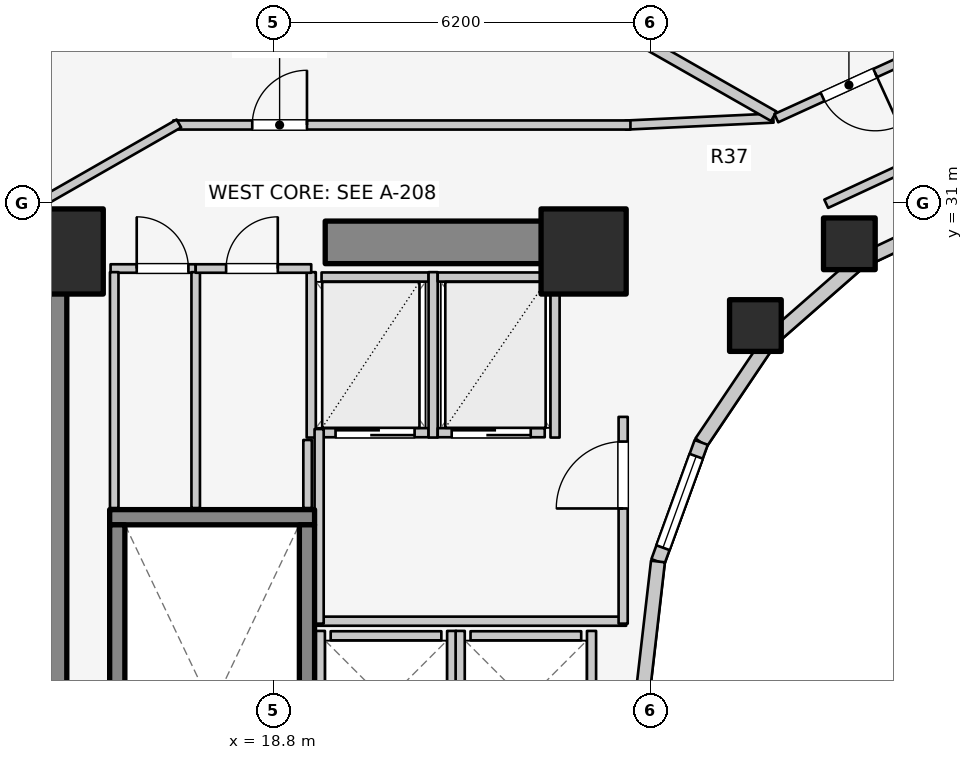
"""IFC4 building model, lengths in metres.
Left out: names, types, materials, properties, quantities, classifications, styles, units other than length and angle.
Written with IfcOpenShell. Run it as: python <this file> out.ifc"""

import sys

from ifc_helpers import new_model, si_unit, direction, frame, frame_2d, origin, origin_2d, place, context, subcontext, project, spatial, rectangle, extrude, element, fill, save


model = new_model("IFC4")
c1 = context("Model", 3, precision=1e-05, world=origin(), true_north=direction((0.0, 1.0)))
c2 = subcontext(c1, "Body", "Model", "MODEL_VIEW")
j1 = project(units=[si_unit("LENGTHUNIT", "METRE"), si_unit("PLANEANGLEUNIT", "RADIAN")], contexts=[c1])
p1 = place(None, origin())
s1 = spatial("IfcSite", under=j1, at=p1, CompositionType="ELEMENT")
p2 = place(p1, origin())
s2 = spatial("IfcBuilding", under=s1, at=p2, CompositionType="ELEMENT")
p3 = place(p2, frame((0.0, 0.0, 88.7)))
s3 = spatial("IfcBuildingStorey", under=s2, at=p3, CompositionType="ELEMENT", Elevation=88.7)
p4 = place(p3, frame((15.05, 17.05, 0.0), z_axis=(0.0, 0.0, 1.0), x_axis=(0.0, 1.0, 0.0)))
e1 = element("IfcWall", 1, at=p4, inside=s3, PredefinedType="SHEAR", context=c2, shape_type="SweptSolid", body=[
    extrude(rectangle(XDim=12.8, YDim=0.7, at=frame_2d((6.4, 0.0))), origin(), (0.0, 0.0, 1.0), 3.1),
])
p5 = place(p3, frame((19.65, 30.35, 0.0), z_axis=(0.0, 0.0, 1.0), x_axis=(1.0, 0.0, 0.0)))
e2 = element("IfcWall", 2, at=p5, inside=s3, PredefinedType="SHEAR", context=c2, shape_type="SweptSolid", body=[
    extrude(rectangle(XDim=4.5, YDim=0.7, at=frame_2d((2.25, 0.0))), origin(), (0.0, 0.0, 1.0), 3.1),
])
p6 = place(p3, frame((16.105, 25.83, 0.0), z_axis=(0.0, 0.0, 1.0), x_axis=(1.0, 0.0, 0.0)))
e3 = element("IfcWall", 3, at=p6, inside=s3, PredefinedType="SOLIDWALL", context=c2, shape_type="SweptSolid", body=[
    extrude(rectangle(XDim=3.37, YDim=0.25, at=frame_2d((1.685, 0.0))), origin(), (0.0, 0.0, 1.0), 3.1),
])
for number, where, z_axis, x_axis in (
    (4, (16.23, 17.895, 0.0), (0.0, 0.0, 1.0), (0.0, 1.0, 0.0)),
    (5, (19.35, 17.895, 0.0), (0.0, 0.0, 1.0), (0.0, 1.0, 0.0)),
):
    element("IfcWall", number, at=place(p3, frame(where, z_axis=z_axis, x_axis=x_axis)), inside=s3, PredefinedType="SOLIDWALL", context=c2, shape_type="SweptSolid", body=[
        extrude(rectangle(XDim=7.81, YDim=0.25, at=frame_2d((3.905, 0.0))), origin(), (0.0, 0.0, 1.0), 3.1),
    ])
for number, where, z_axis, x_axis in (
    (6, (23.9, 30.2, 0.0), (0.0, 0.0, 1.0), (1.0, 0.0, 0.0)),
    (7, (15.3, 30.2, 0.0), (0.0, 0.0, 1.0), (1.0, 0.0, 0.0)),
):
    element("IfcColumn", number, at=place(p3, frame(where, z_axis=z_axis, x_axis=x_axis)), inside=s3, PredefinedType="COLUMN", context=c2, shape_type="SweptSolid", body=[
        extrude(rectangle(XDim=1.4, YDim=1.4, at=origin_2d()), origin(), (0.0, 0.0, 1.0), 3.1),
    ])
for number, where, z_axis, x_axis in (
    (8, (28.27, 30.327, 0.0), (0.0, 0.0, 1.0), (1.0, 0.0, 0.0)),
    (9, (26.725, 28.982, 0.0), (0.0, 0.0, 1.0), (1.0, 0.0, 0.0)),
):
    element("IfcColumn", number, at=place(p3, frame(where, z_axis=z_axis, x_axis=x_axis)), inside=s3, PredefinedType="COLUMN", context=c2, shape_type="SweptSolid", body=[
        extrude(rectangle(XDim=0.85, YDim=0.85, at=origin_2d()), origin(), (0.0, 0.0, 1.0), 3.1),
    ])
p7 = place(p3, frame((30.157, 30.843, 0.0), z_axis=(0.0, 0.0, 1.0), x_axis=(-0.904179699603, -0.427152280606, 0.0)))
e10 = element("IfcWall", 10, at=p7, inside=s3, PredefinedType="STANDARD", context=c2, shape_type="SweptSolid", body=[
    extrude(rectangle(XDim=1.899, YDim=0.23, at=frame_2d((0.95, 0.0))), origin(), (0.0, 0.0, 1.0), 2.16),
])
p8 = place(p3, frame((28.44, 30.032, 0.0), z_axis=(0.0, 0.0, 1.0), x_axis=(-0.752576694707, -0.658504607869, 0.0)))
e11 = element("IfcWall", 11, at=p8, inside=s3, PredefinedType="STANDARD", context=c2, shape_type="SweptSolid", body=[
    extrude(rectangle(XDim=1.959, YDim=0.23, at=frame_2d((0.98, 0.0))), origin(), (0.0, 0.0, 1.0), 2.16),
])
p9 = place(p3, frame((26.965, 28.742, 0.0), z_axis=(0.0, 0.0, 1.0), x_axis=(-0.558197800898, -0.829707909492, 0.0)))
e12 = element("IfcWall", 12, at=p9, inside=s3, PredefinedType="STANDARD", context=c2, shape_type="SweptSolid", body=[
    extrude(rectangle(XDim=2.027, YDim=0.23, at=frame_2d((1.013, 0.0))), origin(), (0.0, 0.0, 1.0), 2.16),
])
p10 = place(p3, frame((25.834, 27.06, 0.0), z_axis=(0.0, 0.0, 1.0), x_axis=(-0.341423187295, -0.93990968033, 0.0)))
e13 = element("IfcWall", 13, at=p10, inside=s3, PredefinedType="STANDARD", context=c2, shape_type="SweptSolid", body=[
    extrude(rectangle(XDim=2.084, YDim=0.23, at=frame_2d((1.042, 0.0))), origin(), (0.0, 0.0, 1.0), 2.84),
])
p11 = place(p10, frame((0.242, 0.0, 0.85)))
e14 = element("IfcOpeningElement", 14, at=p11, cuts=e13, PredefinedType="OPENING", context=c2, shape_type="SweptSolid", body=[
    extrude(rectangle(XDim=1.6, YDim=1.65, at=frame_2d((0.8, 0.825))), frame((0.0, 0.125, 0.0), z_axis=(0.0, -1.0, 0.0), x_axis=(1.0, 0.0, 0.0)), (0.0, 0.0, 1.0), 0.25),
])
p12 = place(p3, frame((25.123, 25.102, 0.0), z_axis=(0.0, 0.0, 1.0), x_axis=(-0.114711713601, -0.993398823617, 0.0)))
e15 = element("IfcWall", 15, at=p12, inside=s3, PredefinedType="STANDARD", context=c2, shape_type="SweptSolid", body=[
    extrude(rectangle(XDim=2.115, YDim=0.23, at=frame_2d((1.058, 0.0))), origin(), (0.0, 0.0, 1.0), 2.84),
])
p13 = place(p3, frame((19.74, 23.88, 0.0), z_axis=(0.0, 0.0, 1.0), x_axis=(1.0, 0.0, 0.0)))
e16 = element("IfcWall", 16, at=p13, inside=s3, PredefinedType="SOLIDWALL", context=c2, shape_type="SweptSolid", body=[
    extrude(rectangle(XDim=1.82, YDim=0.15, at=frame_2d((0.91, 0.0))), origin(), (0.0, 0.0, 1.0), 2.855),
])
for number, where, z_axis, x_axis in (
    (17, (19.57, 21.64, 0.0), (0.0, 0.0, 1.0), (0.0, 1.0, 0.0)),
    (18, (21.73, 21.64, 0.0), (0.0, 0.0, 1.0), (0.0, 1.0, 0.0)),
):
    element("IfcWall", number, at=place(p3, frame(where, z_axis=z_axis, x_axis=x_axis)), inside=s3, PredefinedType="SOLIDWALL", context=c2, shape_type="SweptSolid", body=[
        extrude(rectangle(XDim=2.32, YDim=0.15, at=frame_2d((1.16, 0.0))), origin(), (0.0, 0.0, 1.0), 2.855),
    ])
p14 = place(p3, frame((22.04, 23.88, 0.0), z_axis=(0.0, 0.0, 1.0), x_axis=(1.0, 0.0, 0.0)))
e19 = element("IfcWall", 19, at=p14, inside=s3, PredefinedType="SOLIDWALL", context=c2, shape_type="SweptSolid", body=[
    extrude(rectangle(XDim=1.82, YDim=0.15, at=frame_2d((0.91, 0.0))), origin(), (0.0, 0.0, 1.0), 2.12),
])
p15 = place(p3, frame((21.87, 21.64, 0.0), z_axis=(0.0, 0.0, 1.0), x_axis=(0.0, 1.0, 0.0)))
e20 = element("IfcWall", 20, at=p15, inside=s3, PredefinedType="SOLIDWALL", context=c2, shape_type="SweptSolid", body=[
    extrude(rectangle(XDim=2.32, YDim=0.15, at=frame_2d((1.16, 0.0))), origin(), (0.0, 0.0, 1.0), 2.855),
])
p16 = place(p3, frame((24.03, 21.64, 0.0), z_axis=(0.0, 0.0, 1.0), x_axis=(0.0, 1.0, 0.0)))
e21 = element("IfcWall", 21, at=p16, inside=s3, PredefinedType="SOLIDWALL", context=c2, shape_type="SweptSolid", body=[
    extrude(rectangle(XDim=2.32, YDim=0.15, at=frame_2d((1.16, 0.0))), origin(), (0.0, 0.0, 1.0), 2.12),
])
p17 = place(p3, frame((19.59, 27.22, 0.0), z_axis=(0.0, 0.0, 1.0), x_axis=(1.0, 0.0, 0.0)))
e22 = element("IfcWall", 22, at=p17, inside=s3, PredefinedType="SOLIDWALL", context=c2, shape_type="SweptSolid", body=[
    extrude(rectangle(XDim=1.76, YDim=0.15, at=frame_2d((0.88, 0.0))), origin(), (0.0, 0.0, 1.0), 2.855),
])
p18 = place(p17, frame((0.23, 0.0, 0.0)))
e23 = element("IfcOpeningElement", 23, at=p18, cuts=e22, PredefinedType="OPENING", context=c2, shape_type="SweptSolid", body=[
    extrude(rectangle(XDim=1.3, YDim=2.1, at=frame_2d((0.65, 1.05))), frame((0.0, 0.085, 0.0), z_axis=(0.0, -1.0, 0.0), x_axis=(1.0, 0.0, 0.0)), (0.0, 0.0, 1.0), 0.17),
])
p19 = place(p3, frame((19.59, 29.78, 0.0), z_axis=(0.0, 0.0, 1.0), x_axis=(1.0, 0.0, 0.0)))
e24 = element("IfcWall", 24, at=p19, inside=s3, PredefinedType="SOLIDWALL", context=c2, shape_type="SweptSolid", body=[
    extrude(rectangle(XDim=1.76, YDim=0.15, at=frame_2d((0.88, 0.0))), origin(), (0.0, 0.0, 1.0), 2.855),
])
for number, where, z_axis, x_axis in (
    (25, (19.42, 27.14, 0.0), (0.0, 0.0, 1.0), (0.0, 1.0, 0.0)),
    (26, (21.425, 27.14, 0.0), (0.0, 0.0, 1.0), (0.0, 1.0, 0.0)),
):
    element("IfcWall", number, at=place(p3, frame(where, z_axis=z_axis, x_axis=x_axis)), inside=s3, PredefinedType="SOLIDWALL", context=c2, shape_type="SweptSolid", body=[
        extrude(rectangle(XDim=2.72, YDim=0.15, at=frame_2d((1.36, 0.0))), origin(), (0.0, 0.0, 1.0), 2.855),
    ])
p20 = place(p3, frame((21.5, 27.22, 0.0), z_axis=(0.0, 0.0, 1.0), x_axis=(1.0, 0.0, 0.0)))
e27 = element("IfcWall", 27, at=p20, inside=s3, PredefinedType="SOLIDWALL", context=c2, shape_type="SweptSolid", body=[
    extrude(rectangle(XDim=1.76, YDim=0.15, at=frame_2d((0.88, 0.0))), origin(), (0.0, 0.0, 1.0), 2.855),
])
p21 = place(p20, frame((0.23, 0.0, 0.0)))
e28 = element("IfcOpeningElement", 28, at=p21, cuts=e27, PredefinedType="OPENING", context=c2, shape_type="SweptSolid", body=[
    extrude(rectangle(XDim=1.3, YDim=2.1, at=frame_2d((0.65, 1.05))), frame((0.0, 0.085, 0.0), z_axis=(0.0, -1.0, 0.0), x_axis=(1.0, 0.0, 0.0)), (0.0, 0.0, 1.0), 0.17),
])
p22 = place(p3, frame((21.5, 29.78, 0.0), z_axis=(0.0, 0.0, 1.0), x_axis=(1.0, 0.0, 0.0)))
e29 = element("IfcWall", 29, at=p22, inside=s3, PredefinedType="SOLIDWALL", context=c2, shape_type="SweptSolid", body=[
    extrude(rectangle(XDim=1.76, YDim=0.15, at=frame_2d((0.88, 0.0))), origin(), (0.0, 0.0, 1.0), 2.855),
])
p23 = place(p3, frame((23.43, 27.14, 0.0), z_axis=(0.0, 0.0, 1.0), x_axis=(0.0, 1.0, 0.0)))
e30 = element("IfcWall", 30, at=p23, inside=s3, PredefinedType="SOLIDWALL", context=c2, shape_type="SweptSolid", body=[
    extrude(rectangle(XDim=2.72, YDim=0.15, at=frame_2d((1.36, 0.0))), origin(), (0.0, 0.0, 1.0), 2.855),
])
p24 = place(p3, frame((19.52, 24.12, 0.0), z_axis=(0.0, 0.0, 1.0), x_axis=(1.0, 0.0, 0.0)))
e31 = element("IfcWall", 31, at=p24, inside=s3, PredefinedType="PARTITIONING", context=c2, shape_type="SweptSolid", body=[
    extrude(rectangle(XDim=5.08, YDim=0.15, at=frame_2d((2.54, 0.0))), origin(), (0.0, 0.0, 1.0), 2.12),
])
p25 = place(p3, frame((19.55, 24.08, 0.0), z_axis=(0.0, 0.0, 1.0), x_axis=(0.0, 1.0, 0.0)))
e32 = element("IfcWall", 32, at=p25, inside=s3, PredefinedType="PARTITIONING", context=c2, shape_type="SweptSolid", body=[
    extrude(rectangle(XDim=3.2, YDim=0.15, at=frame_2d((1.6, 0.0))), origin(), (0.0, 0.0, 1.0), 2.855),
])
p26 = place(p3, frame((24.55, 24.08, 0.0), z_axis=(0.0, 0.0, 1.0), x_axis=(0.0, 1.0, 0.0)))
e33 = element("IfcWall", 33, at=p26, inside=s3, PredefinedType="PARTITIONING", context=c2, shape_type="SweptSolid", body=[
    extrude(rectangle(XDim=3.4, YDim=0.15, at=frame_2d((1.7, 0.0))), origin(), (0.0, 0.0, 1.0), 2.855),
])
p27 = place(p26, frame((1.894, 0.0, 0.0)))
e34 = element("IfcOpeningElement", 34, at=p27, cuts=e33, PredefinedType="OPENING", context=c2, shape_type="SweptSolid", body=[
    extrude(rectangle(XDim=1.1, YDim=2.1, at=frame_2d((0.55, 1.05))), frame((0.0, 0.085, 0.0), z_axis=(0.0, -1.0, 0.0), x_axis=(1.0, 0.0, 0.0)), (0.0, 0.0, 1.0), 0.17),
])
p28 = place(p3, frame((16.12, 29.92, 0.0), z_axis=(0.0, 0.0, 1.0), x_axis=(1.0, 0.0, 0.0)))
e35 = element("IfcWall", 35, at=p28, inside=s3, PredefinedType="PLUMBINGWALL", context=c2, shape_type="SweptSolid", body=[
    extrude(rectangle(XDim=1.4, YDim=0.14, at=frame_2d((0.7, 0.0))), origin(), (0.0, 0.0, 1.0), 2.855),
])
p29 = place(p28, frame((0.43, 0.0, 0.0)))
e36 = element("IfcOpeningElement", 36, at=p29, cuts=e35, PredefinedType="OPENING", context=c2, shape_type="SweptSolid", body=[
    extrude(rectangle(XDim=0.85, YDim=2.05, at=frame_2d((0.425, 1.025))), frame((0.0, 0.08, 0.0), z_axis=(0.0, -1.0, 0.0), x_axis=(1.0, 0.0, 0.0)), (0.0, 0.0, 1.0), 0.16),
])
for number, where, z_axis, x_axis in (
    (37, (16.18, 25.98, 0.0), (0.0, 0.0, 1.0), (0.0, 1.0, 0.0)),
    (38, (17.52, 25.98, 0.0), (0.0, 0.0, 1.0), (0.0, 1.0, 0.0)),
):
    element("IfcWall", number, at=place(p3, frame(where, z_axis=z_axis, x_axis=x_axis)), inside=s3, PredefinedType="PLUMBINGWALL", context=c2, shape_type="SweptSolid", body=[
        extrude(rectangle(XDim=3.88, YDim=0.14, at=frame_2d((1.94, 0.0))), origin(), (0.0, 0.0, 1.0), 2.855),
    ])
p30 = place(p3, frame((17.52, 29.92, 0.0), z_axis=(0.0, 0.0, 1.0), x_axis=(1.0, 0.0, 0.0)))
e39 = element("IfcWall", 39, at=p30, inside=s3, PredefinedType="PLUMBINGWALL", context=c2, shape_type="SweptSolid", body=[
    extrude(rectangle(XDim=1.9, YDim=0.14, at=frame_2d((0.95, 0.0))), origin(), (0.0, 0.0, 1.0), 2.855),
])
p31 = place(p30, frame((0.5, 0.0, 0.0)))
e40 = element("IfcOpeningElement", 40, at=p31, cuts=e39, PredefinedType="OPENING", context=c2, shape_type="SweptSolid", body=[
    extrude(rectangle(XDim=0.85, YDim=2.05, at=frame_2d((0.425, 1.025))), frame((0.0, 0.08, 0.0), z_axis=(0.0, -1.0, 0.0), x_axis=(1.0, 0.0, 0.0)), (0.0, 0.0, 1.0), 0.16),
])
p32 = place(p3, frame((19.36, 25.98, 0.0), z_axis=(0.0, 0.0, 1.0), x_axis=(0.0, 1.0, 0.0)))
e41 = element("IfcWall", 41, at=p32, inside=s3, PredefinedType="PLUMBINGWALL", context=c2, shape_type="SweptSolid", body=[
    extrude(rectangle(XDim=1.12, YDim=0.14, at=frame_2d((0.56, 0.0))), origin(), (0.0, 0.0, 1.0), 2.855),
])
p33 = place(p3, frame((29.873, 31.906, 0.0), z_axis=(0.0, 0.0, 1.0), x_axis=(-0.906943449489, -0.421252393975, 0.0)))
e42 = element("IfcWall", 42, at=p33, inside=s3, PredefinedType="PARTITIONING", context=c2, shape_type="SweptSolid", body=[
    extrude(rectangle(XDim=2.186, YDim=0.15, at=frame_2d((1.093, 0.0))), origin(), (0.0, 0.0, 1.0), 2.272),
])
p34 = place(p3, frame((27.02, 32.394, 0.0), z_axis=(0.0, 0.0, 1.0), x_axis=(-0.998877427952, -0.047369651964, 0.0)))
e43 = element("IfcWall", 43, at=p34, inside=s3, PredefinedType="PARTITIONING", context=c2, shape_type="SweptSolid", body=[
    extrude(rectangle(XDim=2.433, YDim=0.15, at=frame_2d((1.216, 0.0))), origin(), (0.0, 0.0, 1.0), 2.272),
])
p35 = place(p3, frame((17.15, 32.28, 0.0), z_axis=(0.0, 0.0, 1.0), x_axis=(1.0, 0.0, 0.0)))
e44 = element("IfcWall", 44, at=p35, inside=s3, PredefinedType="PARTITIONING", context=c2, shape_type="SweptSolid", body=[
    extrude(rectangle(XDim=7.52, YDim=0.15, at=frame_2d((3.76, 0.0))), origin(), (0.0, 0.0, 1.0), 2.272),
])
p36 = place(p35, frame((1.3, 0.0, 0.0)))
e45 = element("IfcOpeningElement", 45, at=p36, cuts=e44, PredefinedType="OPENING", context=c2, shape_type="SweptSolid", body=[
    extrude(rectangle(XDim=0.9, YDim=2.1, at=frame_2d((0.45, 1.05))), frame((0.0, 0.085, 0.0), z_axis=(0.0, -1.0, 0.0), x_axis=(1.0, 0.0, 0.0)), (0.0, 0.0, 1.0), 0.17),
])
p37 = place(p3, frame((17.243, 32.305, 0.0), z_axis=(0.0, 0.0, 1.0), x_axis=(-0.867991349648, -0.496579315857, 0.0)))
e46 = element("IfcWall", 46, at=p37, inside=s3, PredefinedType="PARTITIONING", context=c2, shape_type="SweptSolid", body=[
    extrude(rectangle(XDim=2.567, YDim=0.15, at=frame_2d((1.283, 0.0))), origin(), (0.0, 0.0, 1.0), 2.142),
])
p38 = place(p3, frame((29.411, 33.518, 0.0), z_axis=(0.0, 0.0, 1.0), x_axis=(-0.726306601605, 0.687370875485, 0.0)))
e47 = element("IfcWall", 47, at=p38, inside=s3, PredefinedType="PARTITIONING", context=c2, shape_type="SweptSolid", body=[
    extrude(rectangle(XDim=6.76, YDim=0.18, at=frame_2d((3.38, 0.0))), origin(), (0.0, 0.0, 1.0), 2.272),
])
p39 = place(p3, frame((27.027, 32.424, 0.0), z_axis=(0.0, 0.0, 1.0), x_axis=(-0.868484076301, 0.495717065685, 0.0)))
e48 = element("IfcWall", 48, at=p39, inside=s3, PredefinedType="PARTITIONING", context=c2, shape_type="SweptSolid", body=[
    extrude(rectangle(XDim=8.789, YDim=0.18, at=frame_2d((4.394, 0.0))), origin(), (0.0, 0.0, 1.0), 2.272),
])
p40 = place(p3, frame((29.457, 33.482, 0.0), z_axis=(0.0, 0.0, 1.0), x_axis=(-0.909747571199, -0.415161843982, 0.0)))
e49 = element("IfcWall", 49, at=p40, inside=s3, PredefinedType="PARTITIONING", context=c2, shape_type="SweptSolid", body=[
    extrude(rectangle(XDim=2.625, YDim=0.15, at=frame_2d((1.312, 0.0))), origin(), (0.0, 0.0, 1.0), 2.272),
])
p41 = place(p40, frame((0.838, 0.0, 0.0)))
e50 = element("IfcOpeningElement", 50, at=p41, cuts=e49, PredefinedType="OPENING", context=c2, shape_type="SweptSolid", body=[
    extrude(rectangle(XDim=0.95, YDim=2.1, at=frame_2d((0.475, 1.05))), frame((0.0, 0.085, 0.0), z_axis=(0.0, -1.0, 0.0), x_axis=(1.0, 0.0, 0.0)), (0.0, 0.0, 1.0), 0.17),
])
p42 = place(p11, origin())
e51 = element("IfcWindow", 51, at=p42, inside=s3, PartitioningType="SINGLE_PANEL", PredefinedType="WINDOW", context=c2, shape_type="SweptSolid", body=[
    extrude(rectangle(XDim=1.6, YDim=1.65, at=frame_2d((0.8, 0.825))), frame((0.0, 0.03, 0.0), z_axis=(0.0, -1.0, 0.0), x_axis=(1.0, 0.0, 0.0)), (0.0, 0.0, 1.0), 0.06),
])
fill(e14, e51)
p43 = place(p18, origin())
e52 = element("IfcDoor", 52, at=p43, inside=s3, OperationType="DOUBLE_DOOR_SLIDING", PredefinedType="DOOR", context=c2, shape_type="SweptSolid", body=[
    extrude(rectangle(XDim=1.3, YDim=2.1, at=frame_2d((0.65, 1.05))), frame((0.0, 0.025, 0.0), z_axis=(0.0, -1.0, 0.0), x_axis=(1.0, 0.0, 0.0)), (0.0, 0.0, 1.0), 0.05),
])
fill(e23, e52)
p44 = place(p21, origin())
e53 = element("IfcDoor", 53, at=p44, inside=s3, OperationType="DOUBLE_DOOR_SLIDING", PredefinedType="DOOR", context=c2, shape_type="SweptSolid", body=[
    extrude(rectangle(XDim=1.3, YDim=2.1, at=frame_2d((0.65, 1.05))), frame((0.0, 0.025, 0.0), z_axis=(0.0, -1.0, 0.0), x_axis=(1.0, 0.0, 0.0)), (0.0, 0.0, 1.0), 0.05),
])
fill(e28, e53)
p45 = place(p27, origin())
e54 = element("IfcDoor", 54, at=p45, inside=s3, OperationType="SINGLE_SWING_LEFT", PredefinedType="DOOR", context=c2, shape_type="SweptSolid", body=[
    extrude(rectangle(XDim=1.1, YDim=2.1, at=frame_2d((0.55, 1.05))), frame((0.0, 0.025, 0.0), z_axis=(0.0, -1.0, 0.0), x_axis=(1.0, 0.0, 0.0)), (0.0, 0.0, 1.0), 0.05),
])
fill(e34, e54)
p46 = place(p29, origin())
e55 = element("IfcDoor", 55, at=p46, inside=s3, OperationType="SINGLE_SWING_LEFT", PredefinedType="DOOR", context=c2, shape_type="SweptSolid", body=[
    extrude(rectangle(XDim=0.85, YDim=2.05, at=frame_2d((0.425, 1.025))), frame((0.0, 0.025, 0.0), z_axis=(0.0, -1.0, 0.0), x_axis=(1.0, 0.0, 0.0)), (0.0, 0.0, 1.0), 0.05),
])
fill(e36, e55)
p47 = place(p31, origin())
e56 = element("IfcDoor", 56, at=p47, inside=s3, OperationType="SINGLE_SWING_RIGHT", PredefinedType="DOOR", context=c2, shape_type="SweptSolid", body=[
    extrude(rectangle(XDim=0.85, YDim=2.05, at=frame_2d((0.425, 1.025))), frame((0.0, 0.025, 0.0), z_axis=(0.0, -1.0, 0.0), x_axis=(1.0, 0.0, 0.0)), (0.0, 0.0, 1.0), 0.05),
])
fill(e40, e56)
p48 = place(p36, origin())
e57 = element("IfcDoor", 57, at=p48, inside=s3, OperationType="SINGLE_SWING_RIGHT", PredefinedType="DOOR", context=c2, shape_type="SweptSolid", body=[
    extrude(rectangle(XDim=0.9, YDim=2.1, at=frame_2d((0.45, 1.05))), frame((0.0, 0.025, 0.0), z_axis=(0.0, -1.0, 0.0), x_axis=(1.0, 0.0, 0.0)), (0.0, 0.0, 1.0), 0.05),
])
fill(e45, e57)
p49 = place(p41, origin())
e58 = element("IfcDoor", 58, at=p49, inside=s3, OperationType="SINGLE_SWING_LEFT", PredefinedType="DOOR", context=c2, shape_type="SweptSolid", body=[
    extrude(rectangle(XDim=0.95, YDim=2.1, at=frame_2d((0.475, 1.05))), frame((0.0, 0.025, 0.0), z_axis=(0.0, -1.0, 0.0), x_axis=(1.0, 0.0, 0.0)), (0.0, 0.0, 1.0), 0.05),
])
fill(e50, e58)
save(model, sys.argv[1])
